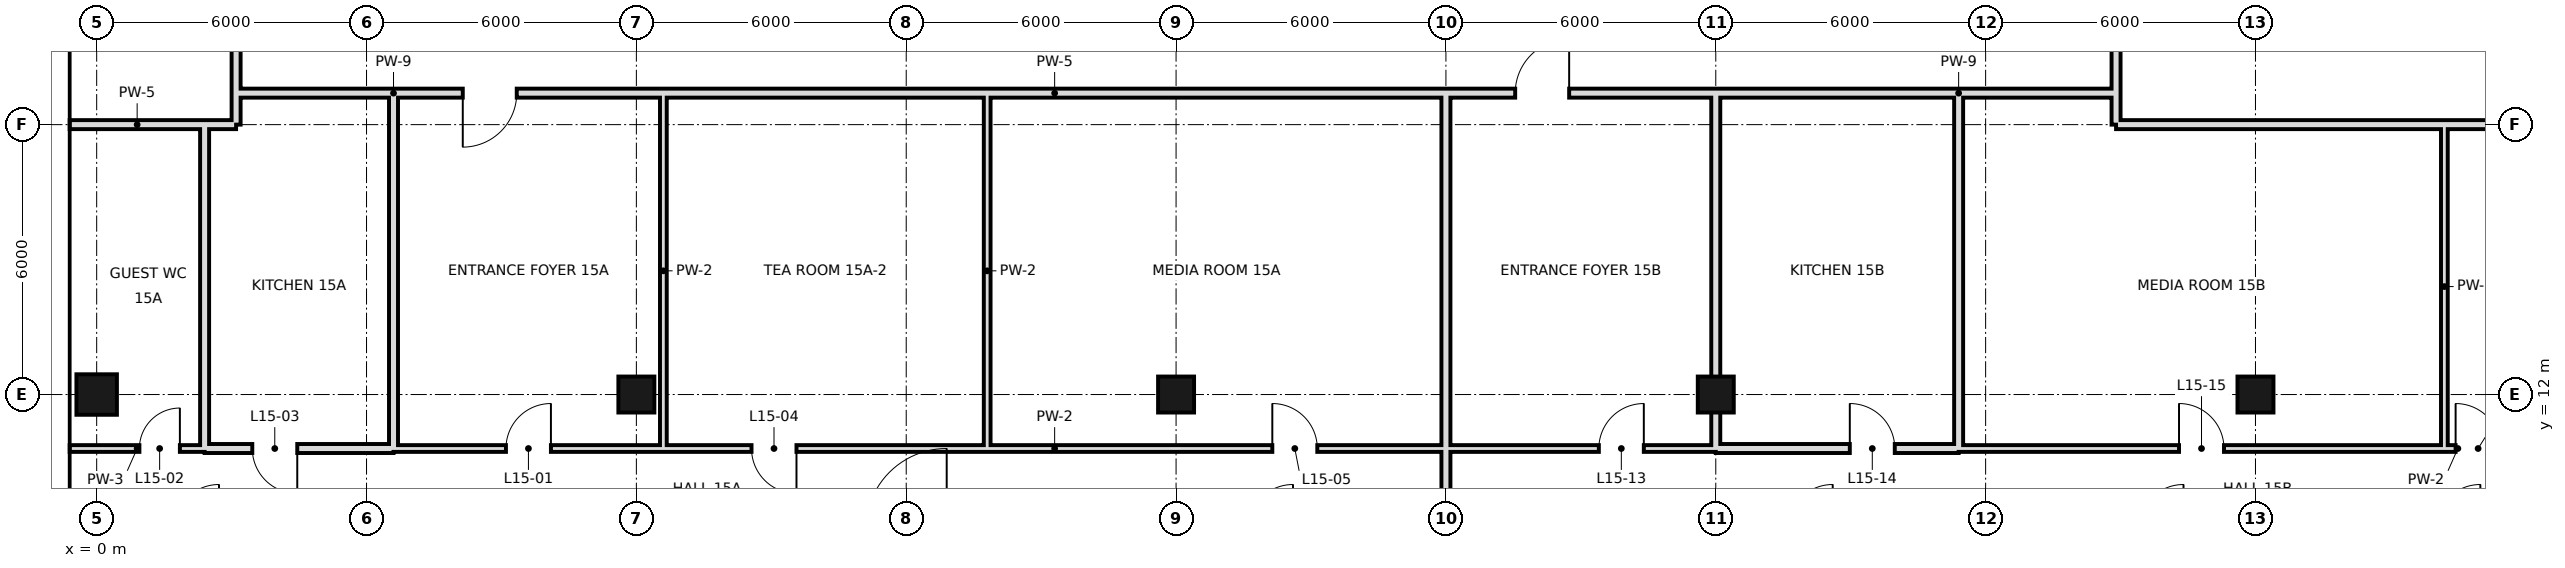
"""IFC4 building model, lengths in metres.
Left out: names, types, materials, properties, quantities, classifications, styles, units other than length and angle.
Written with IfcOpenShell. Run it as: python <this file> out.ifc"""

import sys

from ifc_helpers import new_model, si_unit, direction, frame, frame_2d, origin, origin_2d, place, context, subcontext, project, spatial, rectangle, hollow_rectangle, extrude, element, fill, save


model = new_model("IFC4")
c1 = context("Model", 3, precision=1e-05, world=origin(), true_north=direction((0.0, 1.0)))
c2 = subcontext(c1, "Body", "Model", "MODEL_VIEW")
j1 = project(units=[si_unit("LENGTHUNIT", "METRE"), si_unit("PLANEANGLEUNIT", "RADIAN")], contexts=[c1])
p1 = place(None, origin())
s1 = spatial("IfcSite", under=j1, at=p1, CompositionType="ELEMENT")
p2 = place(p1, origin())
s2 = spatial("IfcBuilding", under=s1, at=p2, CompositionType="ELEMENT")
p3 = place(p2, frame((0.0, 0.0, 75.0)))
s3 = spatial("IfcBuildingStorey", under=s2, at=p3, CompositionType="ELEMENT", Elevation=75.0)
p4 = place(p3, frame((0.0, 12.0, 0.0), z_axis=(0.0, 0.0, 1.0), x_axis=(1.0, 0.0, 0.0)))
e1 = element("IfcColumn", 1, at=p4, inside=s3, PredefinedType="COLUMN", context=c2, shape_type="SweptSolid", body=[
    extrude(hollow_rectangle(XDim=0.9, YDim=0.9, WallThickness=0.045, at=origin_2d()), origin(), (0.0, 0.0, 1.0), 3.6),
])
for number, where, z_axis, x_axis in (
    (2, (12.0, 12.0, 0.0), (0.0, 0.0, 1.0), (1.0, 0.0, 0.0)),
    (3, (24.0, 12.0, 0.0), (0.0, 0.0, 1.0), (1.0, 0.0, 0.0)),
    (4, (36.0, 12.0, 0.0), (0.0, 0.0, 1.0), (1.0, 0.0, 0.0)),
    (5, (48.0, 12.0, 0.0), (0.0, 0.0, 1.0), (1.0, 0.0, 0.0)),
):
    element("IfcColumn", number, at=place(p3, frame(where, z_axis=z_axis, x_axis=x_axis)), inside=s3, PredefinedType="COLUMN", context=c2, shape_type="SweptSolid", body=[
        extrude(hollow_rectangle(XDim=0.8, YDim=0.8, WallThickness=0.04, at=origin_2d()), origin(), (0.0, 0.0, 1.0), 3.6),
    ])
for number, where, z_axis, x_axis in (
    (6, (12.6, 10.8, 0.0), (0.0, 0.0, 1.0), (0.0, 1.0, 0.0)),
    (7, (19.8, 10.8, 0.0), (0.0, 0.0, 1.0), (0.0, 1.0, 0.0)),
):
    element("IfcWall", number, at=place(p3, frame(where, z_axis=z_axis, x_axis=x_axis)), inside=s3, PredefinedType="PARTITIONING", context=c2, shape_type="SweptSolid", body=[
        extrude(rectangle(XDim=7.9, YDim=0.15, at=frame_2d((3.95, 0.0))), origin(), (0.0, 0.0, 1.0), 3.42),
    ])
p5 = place(p3, frame((2.4, 10.8, 0.0), z_axis=(0.0, 0.0, 1.0), x_axis=(0.0, 1.0, 0.0)))
e8 = element("IfcWall", 8, at=p5, inside=s3, PredefinedType="SOLIDWALL", context=c2, shape_type="SweptSolid", body=[
    extrude(rectangle(XDim=7.2, YDim=0.2, at=frame_2d((3.6, 0.0))), origin(), (0.0, 0.0, 1.0), 2.72),
])
p6 = place(p3, frame((3.1, 18.7, 0.0), z_axis=(0.0, 0.0, 1.0), x_axis=(0.0, 1.0, 0.0)))
e9 = element("IfcWall", 9, at=p6, inside=s3, PredefinedType="SOLIDWALL", context=c2, shape_type="SweptSolid", body=[
    extrude(rectangle(XDim=27.249, YDim=0.2, at=frame_2d((13.625, 0.0))), origin(), (0.0, 0.0, 1.0), 2.97),
])
p7 = place(p6, frame((7.66, 0.0, 0.0)))
e10 = element("IfcOpeningElement", 10, at=p7, cuts=e9, PredefinedType="OPENING", context=c2, shape_type="SweptSolid", body=[
    extrude(rectangle(XDim=1.2, YDim=2.4, at=frame_2d((0.6, 1.2))), frame((0.0, 0.11, 0.0), z_axis=(0.0, -1.0, 0.0), x_axis=(1.0, 0.0, 0.0)), (0.0, 0.0, 1.0), 0.22),
])
p8 = place(p3, frame((3.1, 18.0, 0.0), z_axis=(0.0, 0.0, 1.0), x_axis=(0.0, 1.0, 0.0)))
e11 = element("IfcWall", 11, at=p8, inside=s3, PredefinedType="SOLIDWALL", context=c2, shape_type="SweptSolid", body=[
    extrude(rectangle(XDim=0.7, YDim=0.2, at=frame_2d((0.35, 0.0))), origin(), (0.0, 0.0, 1.0), 2.97),
])
p9 = place(p3, frame((30.0, -0.6, 0.0), z_axis=(0.0, 0.0, 1.0), x_axis=(0.0, 1.0, 0.0)))
e12 = element("IfcWall", 12, at=p9, inside=s3, PredefinedType="SOLIDWALL", context=c2, shape_type="SweptSolid", body=[
    extrude(rectangle(XDim=19.3, YDim=0.2, at=frame_2d((9.65, 0.0))), origin(), (0.0, 0.0, 1.0), 2.72),
])
for number, where, z_axis, x_axis in (
    (13, (36.0, 10.8, 0.0), (0.0, 0.0, 1.0), (0.0, 1.0, 0.0)),
    (14, (41.4, 10.8, 0.0), (0.0, 0.0, 1.0), (0.0, 1.0, 0.0)),
):
    element("IfcWall", number, at=place(p3, frame(where, z_axis=z_axis, x_axis=x_axis)), inside=s3, PredefinedType="SOLIDWALL", context=c2, shape_type="SweptSolid", body=[
        extrude(rectangle(XDim=7.9, YDim=0.2, at=frame_2d((3.95, 0.0))), origin(), (0.0, 0.0, 1.0), 2.72),
    ])
p10 = place(p3, frame((44.9, 18.7, 0.0), z_axis=(0.0, 0.0, 1.0), x_axis=(0.0, 1.0, 0.0)))
e15 = element("IfcWall", 15, at=p10, inside=s3, PredefinedType="SOLIDWALL", context=c2, shape_type="SweptSolid", body=[
    extrude(rectangle(XDim=13.7, YDim=0.2, at=frame_2d((6.85, 0.0))), origin(), (0.0, 0.0, 1.0), 2.97),
])
p11 = place(p3, frame((44.9, 18.0, 0.0), z_axis=(0.0, 0.0, 1.0), x_axis=(0.0, 1.0, 0.0)))
e16 = element("IfcWall", 16, at=p11, inside=s3, PredefinedType="SOLIDWALL", context=c2, shape_type="SweptSolid", body=[
    extrude(rectangle(XDim=0.7, YDim=0.2, at=frame_2d((0.35, 0.0))), origin(), (0.0, 0.0, 1.0), 2.97),
])
p12 = place(p3, frame((52.2, 10.8, 0.0), z_axis=(0.0, 0.0, 1.0), x_axis=(0.0, 1.0, 0.0)))
e17 = element("IfcWall", 17, at=p12, inside=s3, PredefinedType="PARTITIONING", context=c2, shape_type="SweptSolid", body=[
    extrude(rectangle(XDim=7.2, YDim=0.15, at=frame_2d((3.6, 0.0))), origin(), (0.0, 0.0, 1.0), 3.42),
])
p13 = place(p3, frame((6.6, 10.8, 0.0), z_axis=(0.0, 0.0, 1.0), x_axis=(0.0, 1.0, 0.0)))
e18 = element("IfcWall", 18, at=p13, inside=s3, PredefinedType="SOLIDWALL", context=c2, shape_type="SweptSolid", body=[
    extrude(rectangle(XDim=7.9, YDim=0.2, at=frame_2d((3.95, 0.0))), origin(), (0.0, 0.0, 1.0), 2.72),
])
p14 = place(p3, frame((2.4, 10.8, 0.0), z_axis=(0.0, 0.0, 1.0), x_axis=(1.0, 0.0, 0.0)))
e19 = element("IfcWall", 19, at=p14, inside=s3, PredefinedType="SOLIDWALL", context=c2, shape_type="SweptSolid", body=[
    extrude(rectangle(XDim=4.2, YDim=0.2, at=frame_2d((2.1, 0.0))), origin(), (0.0, 0.0, 1.0), 2.72),
])
p15 = place(p14, frame((1.06, 0.0, 0.0)))
e20 = element("IfcOpeningElement", 20, at=p15, cuts=e19, PredefinedType="OPENING", context=c2, shape_type="SweptSolid", body=[
    extrude(rectangle(XDim=1.0, YDim=2.4, at=frame_2d((0.5, 1.2))), frame((0.0, 0.11, 0.0), z_axis=(0.0, -1.0, 0.0), x_axis=(1.0, 0.0, 0.0)), (0.0, 0.0, 1.0), 0.22),
])
p16 = place(p3, frame((36.0, 10.8, 0.0), z_axis=(0.0, 0.0, 1.0), x_axis=(1.0, 0.0, 0.0)))
e21 = element("IfcWall", 21, at=p16, inside=s3, PredefinedType="SOLIDWALL", context=c2, shape_type="SweptSolid", body=[
    extrude(rectangle(XDim=5.4, YDim=0.2, at=frame_2d((2.7, 0.0))), origin(), (0.0, 0.0, 1.0), 2.72),
])
p17 = place(p16, frame((2.98, 0.0, 0.0)))
e22 = element("IfcOpeningElement", 22, at=p17, cuts=e21, PredefinedType="OPENING", context=c2, shape_type="SweptSolid", body=[
    extrude(rectangle(XDim=1.0, YDim=2.4, at=frame_2d((0.5, 1.2))), frame((0.0, 0.11, 0.0), z_axis=(0.0, -1.0, 0.0), x_axis=(1.0, 0.0, 0.0)), (0.0, 0.0, 1.0), 0.22),
])
p18 = place(p3, frame((6.6, 10.8, 0.0), z_axis=(0.0, 0.0, 1.0), x_axis=(1.0, 0.0, 0.0)))
e23 = element("IfcWall", 23, at=p18, inside=s3, PredefinedType="PARTITIONING", context=c2, shape_type="SweptSolid", body=[
    extrude(rectangle(XDim=29.4, YDim=0.15, at=frame_2d((14.7, 0.0))), origin(), (0.0, 0.0, 1.0), 3.42),
])
p19 = place(p18, frame((2.5, 0.0, 0.0)))
e24 = element("IfcOpeningElement", 24, at=p19, cuts=e23, PredefinedType="OPENING", context=c2, shape_type="SweptSolid", body=[
    extrude(rectangle(XDim=1.0, YDim=2.4, at=frame_2d((0.5, 1.2))), frame((0.0, 0.085, 0.0), z_axis=(0.0, -1.0, 0.0), x_axis=(1.0, 0.0, 0.0)), (0.0, 0.0, 1.0), 0.17),
])
p20 = place(p18, frame((7.96, 0.0, 0.0)))
e25 = element("IfcOpeningElement", 25, at=p20, cuts=e23, PredefinedType="OPENING", context=c2, shape_type="SweptSolid", body=[
    extrude(rectangle(XDim=1.0, YDim=2.4, at=frame_2d((0.5, 1.2))), frame((0.0, 0.085, 0.0), z_axis=(0.0, -1.0, 0.0), x_axis=(1.0, 0.0, 0.0)), (0.0, 0.0, 1.0), 0.17),
])
p21 = place(p18, frame((19.54, 0.0, 0.0)))
e26 = element("IfcOpeningElement", 26, at=p21, cuts=e23, PredefinedType="OPENING", context=c2, shape_type="SweptSolid", body=[
    extrude(rectangle(XDim=1.0, YDim=2.4, at=frame_2d((0.5, 1.2))), frame((0.0, 0.085, 0.0), z_axis=(0.0, -1.0, 0.0), x_axis=(1.0, 0.0, 0.0)), (0.0, 0.0, 1.0), 0.17),
])
p22 = place(p18, frame((26.8, 0.0, 0.0)))
e27 = element("IfcOpeningElement", 27, at=p22, cuts=e23, PredefinedType="OPENING", context=c2, shape_type="SweptSolid", body=[
    extrude(rectangle(XDim=1.0, YDim=2.4, at=frame_2d((0.5, 1.2))), frame((0.0, 0.085, 0.0), z_axis=(0.0, -1.0, 0.0), x_axis=(1.0, 0.0, 0.0)), (0.0, 0.0, 1.0), 0.17),
])
p23 = place(p3, frame((41.4, 10.8, 0.0), z_axis=(0.0, 0.0, 1.0), x_axis=(1.0, 0.0, 0.0)))
e28 = element("IfcWall", 28, at=p23, inside=s3, PredefinedType="PARTITIONING", context=c2, shape_type="SweptSolid", body=[
    extrude(rectangle(XDim=22.2, YDim=0.15, at=frame_2d((11.1, 0.0))), origin(), (0.0, 0.0, 1.0), 3.42),
])
p24 = place(p23, frame((4.9, 0.0, 0.0)))
e29 = element("IfcOpeningElement", 29, at=p24, cuts=e28, PredefinedType="OPENING", context=c2, shape_type="SweptSolid", body=[
    extrude(rectangle(XDim=1.0, YDim=2.4, at=frame_2d((0.5, 1.2))), frame((0.0, 0.085, 0.0), z_axis=(0.0, -1.0, 0.0), x_axis=(1.0, 0.0, 0.0)), (0.0, 0.0, 1.0), 0.17),
])
p25 = place(p23, frame((11.05, 0.0, 0.0)))
e30 = element("IfcOpeningElement", 30, at=p25, cuts=e28, PredefinedType="OPENING", context=c2, shape_type="SweptSolid", body=[
    extrude(rectangle(XDim=1.0, YDim=2.4, at=frame_2d((0.5, 1.2))), frame((0.0, 0.085, 0.0), z_axis=(0.0, -1.0, 0.0), x_axis=(1.0, 0.0, 0.0)), (0.0, 0.0, 1.0), 0.17),
])
p26 = place(p3, frame((-0.6, 10.8, 0.0), z_axis=(0.0, 0.0, 1.0), x_axis=(1.0, 0.0, 0.0)))
e31 = element("IfcWall", 31, at=p26, inside=s3, PredefinedType="PARTITIONING", context=c2, shape_type="SweptSolid", body=[
    extrude(rectangle(XDim=3.0, YDim=0.15, at=frame_2d((1.5, 0.0))), origin(), (0.0, 0.0, 1.0), 3.42),
])
p27 = place(p26, frame((1.55, 0.0, 0.0)))
e32 = element("IfcOpeningElement", 32, at=p27, cuts=e31, PredefinedType="OPENING", context=c2, shape_type="SweptSolid", body=[
    extrude(rectangle(XDim=0.9, YDim=2.4, at=frame_2d((0.45, 1.2))), frame((0.0, 0.085, 0.0), z_axis=(0.0, -1.0, 0.0), x_axis=(1.0, 0.0, 0.0)), (0.0, 0.0, 1.0), 0.17),
])
p28 = place(p3, frame((-0.6, 18.0, 0.0), z_axis=(0.0, 0.0, 1.0), x_axis=(1.0, 0.0, 0.0)))
e33 = element("IfcWall", 33, at=p28, inside=s3, PredefinedType="SOLIDWALL", context=c2, shape_type="SweptSolid", body=[
    extrude(rectangle(XDim=3.0, YDim=0.2, at=frame_2d((1.5, 0.0))), origin(), (0.0, 0.0, 1.0), 2.72),
])
p29 = place(p3, frame((2.4, 18.0, 0.0), z_axis=(0.0, 0.0, 1.0), x_axis=(1.0, 0.0, 0.0)))
e34 = element("IfcWall", 34, at=p29, inside=s3, PredefinedType="SOLIDWALL", context=c2, shape_type="SweptSolid", body=[
    extrude(rectangle(XDim=0.7, YDim=0.2, at=frame_2d((0.35, 0.0))), origin(), (0.0, 0.0, 1.0), 2.97),
])
p30 = place(p3, frame((44.9, 18.0, 0.0), z_axis=(0.0, 0.0, 1.0), x_axis=(1.0, 0.0, 0.0)))
e35 = element("IfcWall", 35, at=p30, inside=s3, PredefinedType="SOLIDWALL", context=c2, shape_type="SweptSolid", body=[
    extrude(rectangle(XDim=21.7, YDim=0.2, at=frame_2d((10.85, 0.0))), origin(), (0.0, 0.0, 1.0), 2.52),
])
p31 = place(p3, frame((6.6, 18.7, 0.0), z_axis=(0.0, 0.0, 1.0), x_axis=(1.0, 0.0, 0.0)))
e36 = element("IfcWall", 36, at=p31, inside=s3, PredefinedType="SOLIDWALL", context=c2, shape_type="SweptSolid", body=[
    extrude(rectangle(XDim=29.4, YDim=0.2, at=frame_2d((14.7, 0.0))), origin(), (0.0, 0.0, 1.0), 2.72),
])
p32 = place(p31, frame((1.54, 0.0, 0.0)))
e37 = element("IfcOpeningElement", 37, at=p32, cuts=e36, PredefinedType="OPENING", context=c2, shape_type="SweptSolid", body=[
    extrude(rectangle(XDim=1.2, YDim=2.4, at=frame_2d((0.6, 1.2))), frame((0.0, 0.11, 0.0), z_axis=(0.0, -1.0, 0.0), x_axis=(1.0, 0.0, 0.0)), (0.0, 0.0, 1.0), 0.22),
])
p33 = place(p31, frame((24.94, 0.0, 0.0)))
e38 = element("IfcOpeningElement", 38, at=p33, cuts=e36, PredefinedType="OPENING", context=c2, shape_type="SweptSolid", body=[
    extrude(rectangle(XDim=1.2, YDim=2.4, at=frame_2d((0.6, 1.2))), frame((0.0, 0.11, 0.0), z_axis=(0.0, -1.0, 0.0), x_axis=(1.0, 0.0, 0.0)), (0.0, 0.0, 1.0), 0.22),
])
for number, where, z_axis, x_axis in (
    (39, (41.4, 18.7, 0.0), (0.0, 0.0, 1.0), (1.0, 0.0, 0.0)),
    (40, (3.1, 18.7, 0.0), (0.0, 0.0, 1.0), (1.0, 0.0, 0.0)),
):
    element("IfcWall", number, at=place(p3, frame(where, z_axis=z_axis, x_axis=x_axis)), inside=s3, PredefinedType="SOLIDWALL", context=c2, shape_type="SweptSolid", body=[
        extrude(rectangle(XDim=3.5, YDim=0.2, at=frame_2d((1.75, 0.0))), origin(), (0.0, 0.0, 1.0), 2.72),
    ])
p34 = place(p3, frame((36.0, 18.7, 0.0), z_axis=(0.0, 0.0, 1.0), x_axis=(1.0, 0.0, 0.0)))
e41 = element("IfcWall", 41, at=p34, inside=s3, PredefinedType="SOLIDWALL", context=c2, shape_type="SweptSolid", body=[
    extrude(rectangle(XDim=5.4, YDim=0.2, at=frame_2d((2.7, 0.0))), origin(), (0.0, 0.0, 1.0), 3.42),
])
p35 = place(p19, frame((1.0, 0.0, 0.0), z_axis=(0.0, 0.0, 1.0), x_axis=(-1.0, 0.0, 0.0)))
e42 = element("IfcDoor", 42, at=p35, inside=s3, OperationType="SINGLE_SWING_LEFT", PredefinedType="DOOR", context=c2, shape_type="SweptSolid", body=[
    extrude(rectangle(XDim=1.0, YDim=2.4, at=frame_2d((0.5, 1.2))), frame((0.0, 0.025, 0.0), z_axis=(0.0, -1.0, 0.0), x_axis=(1.0, 0.0, 0.0)), (0.0, 0.0, 1.0), 0.05),
])
fill(e24, e42)
p36 = place(p27, frame((0.9, 0.0, 0.0), z_axis=(0.0, 0.0, 1.0), x_axis=(-1.0, 0.0, 0.0)))
e43 = element("IfcDoor", 43, at=p36, inside=s3, OperationType="SINGLE_SWING_LEFT", PredefinedType="DOOR", context=c2, shape_type="SweptSolid", body=[
    extrude(rectangle(XDim=0.9, YDim=2.4, at=frame_2d((0.45, 1.2))), frame((0.0, 0.025, 0.0), z_axis=(0.0, -1.0, 0.0), x_axis=(1.0, 0.0, 0.0)), (0.0, 0.0, 1.0), 0.05),
])
fill(e32, e43)
p37 = place(p15, origin())
e44 = element("IfcDoor", 44, at=p37, inside=s3, OperationType="SINGLE_SWING_RIGHT", PredefinedType="DOOR", context=c2, shape_type="SweptSolid", body=[
    extrude(rectangle(XDim=1.0, YDim=2.4, at=frame_2d((0.5, 1.2))), frame((0.0, 0.025, 0.0), z_axis=(0.0, -1.0, 0.0), x_axis=(1.0, 0.0, 0.0)), (0.0, 0.0, 1.0), 0.05),
])
fill(e20, e44)
p38 = place(p20, origin())
e45 = element("IfcDoor", 45, at=p38, inside=s3, OperationType="SINGLE_SWING_RIGHT", PredefinedType="DOOR", context=c2, shape_type="SweptSolid", body=[
    extrude(rectangle(XDim=1.0, YDim=2.4, at=frame_2d((0.5, 1.2))), frame((0.0, 0.025, 0.0), z_axis=(0.0, -1.0, 0.0), x_axis=(1.0, 0.0, 0.0)), (0.0, 0.0, 1.0), 0.05),
])
fill(e25, e45)
p39 = place(p21, origin())
e46 = element("IfcDoor", 46, at=p39, inside=s3, OperationType="SINGLE_SWING_LEFT", PredefinedType="DOOR", context=c2, shape_type="SweptSolid", body=[
    extrude(rectangle(XDim=1.0, YDim=2.4, at=frame_2d((0.5, 1.2))), frame((0.0, 0.025, 0.0), z_axis=(0.0, -1.0, 0.0), x_axis=(1.0, 0.0, 0.0)), (0.0, 0.0, 1.0), 0.05),
])
fill(e26, e46)
p40 = place(p22, frame((1.0, 0.0, 0.0), z_axis=(0.0, 0.0, 1.0), x_axis=(-1.0, 0.0, 0.0)))
e47 = element("IfcDoor", 47, at=p40, inside=s3, OperationType="SINGLE_SWING_LEFT", PredefinedType="DOOR", context=c2, shape_type="SweptSolid", body=[
    extrude(rectangle(XDim=1.0, YDim=2.4, at=frame_2d((0.5, 1.2))), frame((0.0, 0.025, 0.0), z_axis=(0.0, -1.0, 0.0), x_axis=(1.0, 0.0, 0.0)), (0.0, 0.0, 1.0), 0.05),
])
fill(e27, e47)
p41 = place(p17, origin())
e48 = element("IfcDoor", 48, at=p41, inside=s3, OperationType="SINGLE_SWING_LEFT", PredefinedType="DOOR", context=c2, shape_type="SweptSolid", body=[
    extrude(rectangle(XDim=1.0, YDim=2.4, at=frame_2d((0.5, 1.2))), frame((0.0, 0.025, 0.0), z_axis=(0.0, -1.0, 0.0), x_axis=(1.0, 0.0, 0.0)), (0.0, 0.0, 1.0), 0.05),
])
fill(e22, e48)
p42 = place(p24, origin())
e49 = element("IfcDoor", 49, at=p42, inside=s3, OperationType="SINGLE_SWING_LEFT", PredefinedType="DOOR", context=c2, shape_type="SweptSolid", body=[
    extrude(rectangle(XDim=1.0, YDim=2.4, at=frame_2d((0.5, 1.2))), frame((0.0, 0.025, 0.0), z_axis=(0.0, -1.0, 0.0), x_axis=(1.0, 0.0, 0.0)), (0.0, 0.0, 1.0), 0.05),
])
fill(e29, e49)
p43 = place(p25, origin())
e50 = element("IfcDoor", 50, at=p43, inside=s3, OperationType="SINGLE_SWING_LEFT", PredefinedType="DOOR", context=c2, shape_type="SweptSolid", body=[
    extrude(rectangle(XDim=1.0, YDim=2.4, at=frame_2d((0.5, 1.2))), frame((0.0, 0.025, 0.0), z_axis=(0.0, -1.0, 0.0), x_axis=(1.0, 0.0, 0.0)), (0.0, 0.0, 1.0), 0.05),
])
fill(e30, e50)
p44 = place(p32, frame((1.2, 0.0, 0.0), z_axis=(0.0, 0.0, 1.0), x_axis=(-1.0, 0.0, 0.0)))
e51 = element("IfcDoor", 51, at=p44, inside=s3, OperationType="SINGLE_SWING_RIGHT", PredefinedType="DOOR", context=c2, shape_type="SweptSolid", body=[
    extrude(rectangle(XDim=1.2, YDim=2.4, at=frame_2d((0.6, 1.2))), frame((0.0, 0.025, 0.0), z_axis=(0.0, -1.0, 0.0), x_axis=(1.0, 0.0, 0.0)), (0.0, 0.0, 1.0), 0.05),
])
fill(e37, e51)
p45 = place(p33, frame((1.2, 0.0, 0.0), z_axis=(0.0, 0.0, 1.0), x_axis=(-1.0, 0.0, 0.0)))
e52 = element("IfcDoor", 52, at=p45, inside=s3, OperationType="SINGLE_SWING_LEFT", PredefinedType="DOOR", context=c2, shape_type="SweptSolid", body=[
    extrude(rectangle(XDim=1.2, YDim=2.4, at=frame_2d((0.6, 1.2))), frame((0.0, 0.025, 0.0), z_axis=(0.0, -1.0, 0.0), x_axis=(1.0, 0.0, 0.0)), (0.0, 0.0, 1.0), 0.05),
])
fill(e38, e52)
save(model, sys.argv[1])
